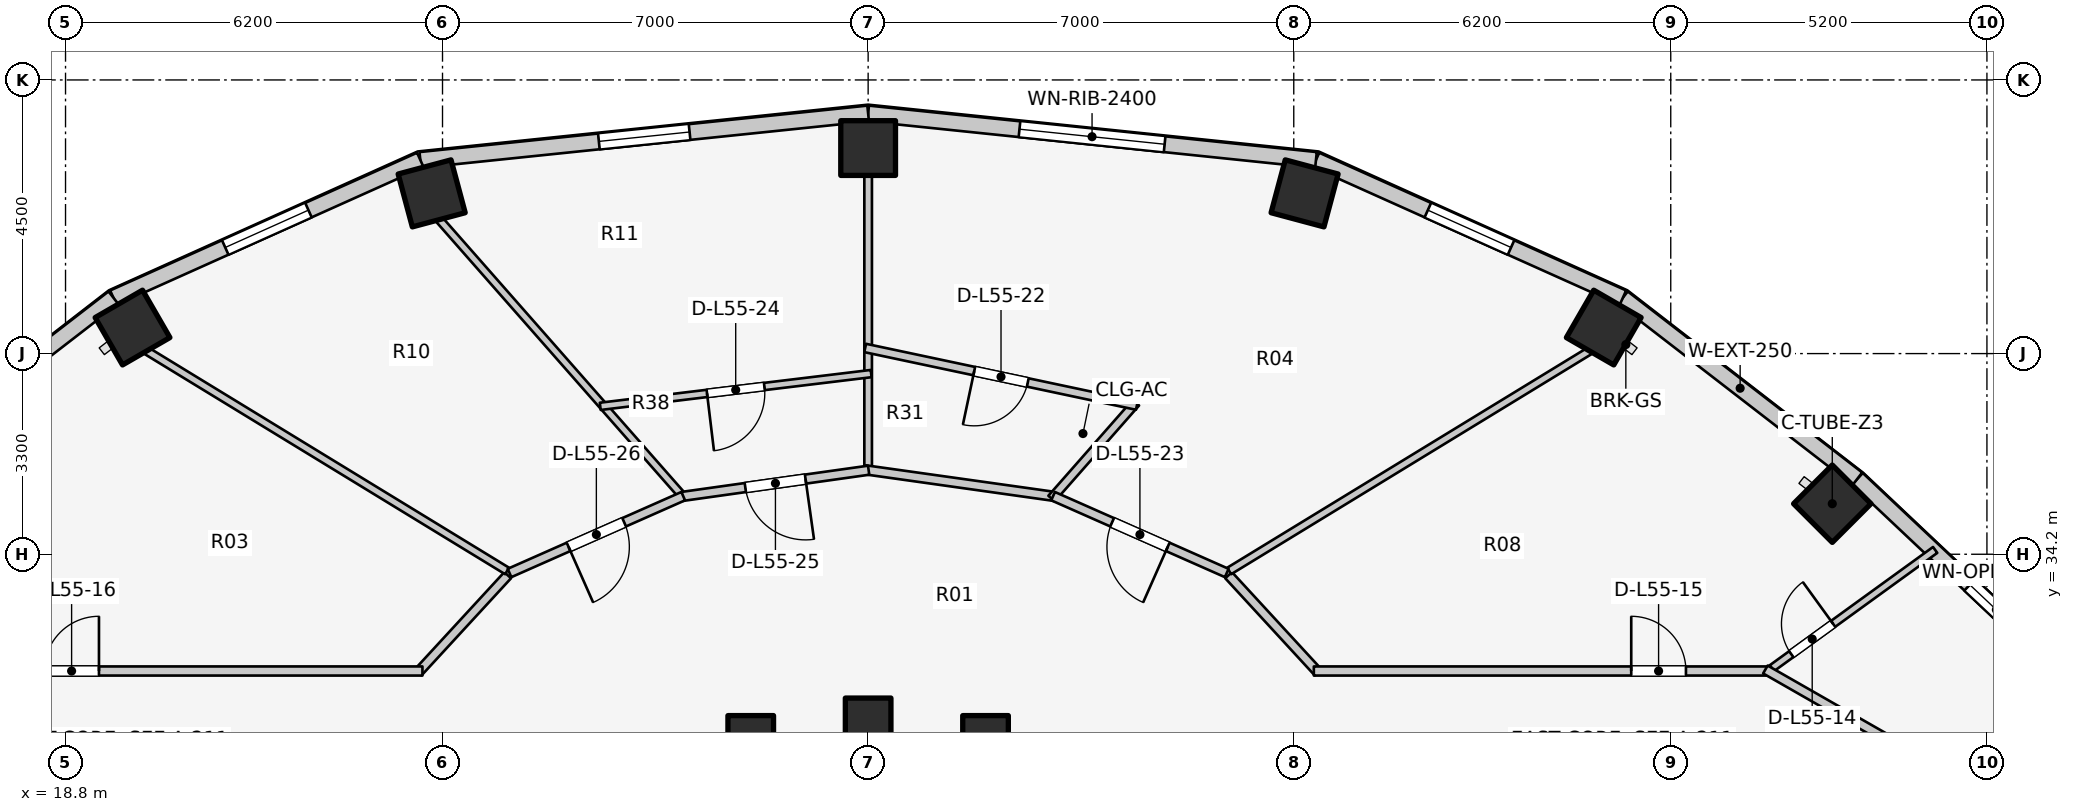
"""IFC4 building model, lengths in metres.
Left out: names, types, materials, properties, quantities, classifications, styles, units other than length and angle.
Written with IfcOpenShell. Run it as: python <this file> out.ifc"""

import sys

from ifc_helpers import new_model, si_unit, direction, frame, frame_2d, origin, origin_2d, place, context, subcontext, project, spatial, rectangle, extrude, element, fill, save


model = new_model("IFC4")
c1 = context("Model", 3, precision=1e-05, world=origin(), true_north=direction((0.0, 1.0)))
c2 = subcontext(c1, "Body", "Model", "MODEL_VIEW")
j1 = project(units=[si_unit("LENGTHUNIT", "METRE"), si_unit("PLANEANGLEUNIT", "RADIAN")], contexts=[c1])
p1 = place(None, origin())
s1 = spatial("IfcSite", under=j1, at=p1, CompositionType="ELEMENT")
p2 = place(p1, origin())
s2 = spatial("IfcBuilding", under=s1, at=p2, CompositionType="ELEMENT")
p3 = place(p2, frame((0.0, 0.0, 180.8)))
s3 = spatial("IfcBuildingStorey", under=s2, at=p3, CompositionType="ELEMENT", Elevation=180.8)
for number, where, z_axis, x_axis in (
    (1, (47.857, 35.031, 0.0), (0.0, 0.0, 1.0), (0.707, 0.707, 0.0)),
    (2, (44.098, 37.928, 0.0), (0.0, 0.0, 1.0), (0.5, 0.866, 0.0)),
):
    element("IfcColumn", number, at=place(p3, frame(where, z_axis=z_axis, x_axis=x_axis)), inside=s3, PredefinedType="COLUMN", context=c2, shape_type="SweptSolid", body=[
        extrude(rectangle(XDim=0.9, YDim=0.9, at=origin_2d()), origin(), (0.0, 0.0, 1.0), 3.1),
    ])
p4 = place(p3, frame((33.931, 31.172, 0.0), z_axis=(0.0, 0.0, 1.0), x_axis=(1.0, 0.0, 0.0)))
e3 = element("IfcColumn", 3, at=p4, inside=s3, PredefinedType="COLUMN", context=c2, shape_type="SweptSolid", body=[
    extrude(rectangle(XDim=0.75, YDim=0.75, at=origin_2d()), origin(), (0.0, 0.0, 1.0), 3.1),
])
p5 = place(p3, frame((39.178, 40.135, 0.0), z_axis=(0.0, 0.0, 1.0), x_axis=(0.258819045103, 0.965925826289, 0.0)))
e4 = element("IfcColumn", 4, at=p5, inside=s3, PredefinedType="COLUMN", context=c2, shape_type="SweptSolid", body=[
    extrude(rectangle(XDim=0.9, YDim=0.9, at=origin_2d()), origin(), (0.0, 0.0, 1.0), 3.1),
])
p6 = place(p3, frame((32.0, 31.46, 0.0), z_axis=(0.0, 0.0, 1.0), x_axis=(1.0, 0.0, 0.0)))
e5 = element("IfcColumn", 5, at=p6, inside=s3, PredefinedType="COLUMN", context=c2, shape_type="SweptSolid", body=[
    extrude(rectangle(XDim=0.75, YDim=0.75, at=origin_2d()), origin(), (0.0, 0.0, 1.0), 3.1),
])
p7 = place(p3, frame((32.0, 40.88, 0.0), z_axis=(0.0, 0.0, 1.0), x_axis=(0.0, 1.0, 0.0)))
e6 = element("IfcColumn", 6, at=p7, inside=s3, PredefinedType="COLUMN", context=c2, shape_type="SweptSolid", body=[
    extrude(rectangle(XDim=0.9, YDim=0.9, at=origin_2d()), origin(), (0.0, 0.0, 1.0), 3.1),
])
p8 = place(p3, frame((30.069, 31.172, 0.0), z_axis=(0.0, 0.0, 1.0), x_axis=(1.0, 0.0, 0.0)))
e7 = element("IfcColumn", 7, at=p8, inside=s3, PredefinedType="COLUMN", context=c2, shape_type="SweptSolid", body=[
    extrude(rectangle(XDim=0.75, YDim=0.75, at=origin_2d()), origin(), (0.0, 0.0, 1.0), 3.1),
])
for number, where, z_axis, x_axis in (
    (8, (24.822, 40.135, 0.0), (0.0, 0.0, 1.0), (-0.259, 0.966, 0.0)),
    (9, (19.902, 37.928, 0.0), (0.0, 0.0, 1.0), (-0.5, 0.866, 0.0)),
):
    element("IfcColumn", number, at=place(p3, frame(where, z_axis=z_axis, x_axis=x_axis)), inside=s3, PredefinedType="COLUMN", context=c2, shape_type="SweptSolid", body=[
        extrude(rectangle(XDim=0.9, YDim=0.9, at=origin_2d()), origin(), (0.0, 0.0, 1.0), 3.1),
    ])
p9 = place(p3, frame((51.619, 32.284, 0.0), z_axis=(0.0, 0.0, 1.0), x_axis=(-0.727667301037, 0.68593024354, 0.0)))
e10 = element("IfcWall", 10, at=p9, inside=s3, PredefinedType="STANDARD", context=c2, shape_type="SweptSolid", body=[
    extrude(rectangle(XDim=4.604, YDim=0.26, at=frame_2d((2.302, 0.0))), origin(), (0.0, 0.0, 1.0), 2.85),
])
p10 = place(p9, frame((0.862, 0.0, 0.75)))
e11 = element("IfcOpeningElement", 11, at=p10, cuts=e10, PredefinedType="OPENING", context=c2, shape_type="SweptSolid", body=[
    extrude(rectangle(XDim=1.2, YDim=1.5, at=frame_2d((0.6, 0.75))), frame((0.0, 0.14, 0.0), z_axis=(0.0, -1.0, 0.0), x_axis=(1.0, 0.0, 0.0)), (0.0, 0.0, 1.0), 0.28),
])
p11 = place(p3, frame((48.269, 35.441, 0.0), z_axis=(0.0, 0.0, 1.0), x_axis=(-0.791460185804, 0.611220724687, 0.0)))
e12 = element("IfcWall", 12, at=p11, inside=s3, PredefinedType="STANDARD", context=c2, shape_type="SweptSolid", body=[
    extrude(rectangle(XDim=4.872, YDim=0.26, at=frame_2d((2.436, 0.0))), origin(), (0.0, 0.0, 1.0), 2.85),
])
p12 = place(p3, frame((44.413, 38.419, 0.0), z_axis=(0.0, 0.0, 1.0), x_axis=(-0.912353637112, 0.409403029847, 0.0)))
e13 = element("IfcWall", 13, at=p12, inside=s3, PredefinedType="STANDARD", context=c2, shape_type="SweptSolid", body=[
    extrude(rectangle(XDim=5.533, YDim=0.26, at=frame_2d((2.766, 0.0))), origin(), (0.0, 0.0, 1.0), 2.85),
])
p13 = place(p12, frame((2.016, 0.0, 0.75)))
e14 = element("IfcOpeningElement", 14, at=p13, cuts=e13, PredefinedType="OPENING", context=c2, shape_type="SweptSolid", body=[
    extrude(rectangle(XDim=1.5, YDim=1.6, at=frame_2d((0.75, 0.8))), frame((0.0, 0.14, 0.0), z_axis=(0.0, -1.0, 0.0), x_axis=(1.0, 0.0, 0.0)), (0.0, 0.0, 1.0), 0.28),
])
p14 = place(p3, frame((39.365, 40.685, 0.0), z_axis=(0.0, 0.0, 1.0), x_axis=(-0.994664178965, 0.10316574569, 0.0)))
e15 = element("IfcWall", 15, at=p14, inside=s3, PredefinedType="STANDARD", context=c2, shape_type="SweptSolid", body=[
    extrude(rectangle(XDim=7.405, YDim=0.26, at=frame_2d((3.702, 0.0))), origin(), (0.0, 0.0, 1.0), 2.85),
])
p15 = place(p14, frame((2.502, 0.0, 0.75)))
e16 = element("IfcOpeningElement", 16, at=p15, cuts=e15, PredefinedType="OPENING", context=c2, shape_type="SweptSolid", body=[
    extrude(rectangle(XDim=2.4, YDim=1.7, at=frame_2d((1.2, 0.85))), frame((0.0, 0.14, 0.0), z_axis=(0.0, -1.0, 0.0), x_axis=(1.0, 0.0, 0.0)), (0.0, 0.0, 1.0), 0.28),
])
p16 = place(p3, frame((32.0, 41.448, 0.0), z_axis=(0.0, 0.0, 1.0), x_axis=(-0.994664178965, -0.10316574569, 0.0)))
e17 = element("IfcWall", 17, at=p16, inside=s3, PredefinedType="STANDARD", context=c2, shape_type="SweptSolid", body=[
    extrude(rectangle(XDim=7.405, YDim=0.26, at=frame_2d((3.702, 0.0))), origin(), (0.0, 0.0, 1.0), 2.85),
])
p17 = place(p16, frame((2.952, 0.0, 0.75)))
e18 = element("IfcOpeningElement", 18, at=p17, cuts=e17, PredefinedType="OPENING", context=c2, shape_type="SweptSolid", body=[
    extrude(rectangle(XDim=1.5, YDim=1.6, at=frame_2d((0.75, 0.8))), frame((0.0, 0.14, 0.0), z_axis=(0.0, -1.0, 0.0), x_axis=(1.0, 0.0, 0.0)), (0.0, 0.0, 1.0), 0.28),
])
p18 = place(p3, frame((24.635, 40.685, 0.0), z_axis=(0.0, 0.0, 1.0), x_axis=(-0.912353637112, -0.409403029847, 0.0)))
e19 = element("IfcWall", 19, at=p18, inside=s3, PredefinedType="STANDARD", context=c2, shape_type="SweptSolid", body=[
    extrude(rectangle(XDim=5.533, YDim=0.26, at=frame_2d((2.766, 0.0))), origin(), (0.0, 0.0, 1.0), 2.85),
])
p19 = place(p18, frame((2.016, 0.0, 0.75)))
e20 = element("IfcOpeningElement", 20, at=p19, cuts=e19, PredefinedType="OPENING", context=c2, shape_type="SweptSolid", body=[
    extrude(rectangle(XDim=1.5, YDim=1.6, at=frame_2d((0.75, 0.8))), frame((0.0, 0.14, 0.0), z_axis=(0.0, -1.0, 0.0), x_axis=(1.0, 0.0, 0.0)), (0.0, 0.0, 1.0), 0.28),
])
p20 = place(p3, frame((19.587, 38.419, 0.0), z_axis=(0.0, 0.0, 1.0), x_axis=(-0.791460185804, -0.611220724687, 0.0)))
e21 = element("IfcWall", 21, at=p20, inside=s3, PredefinedType="STANDARD", context=c2, shape_type="SweptSolid", body=[
    extrude(rectangle(XDim=4.872, YDim=0.26, at=frame_2d((2.436, 0.0))), origin(), (0.0, 0.0, 1.0), 2.85),
])
p21 = place(p3, frame((46.76, 32.251, 0.0), z_axis=(0.0, 0.0, 1.0), x_axis=(0.80983526768, 0.58665734396, 0.0)))
e22 = element("IfcWall", 22, at=p21, inside=s3, PredefinedType="MOVABLE", context=c2, shape_type="SweptSolid", body=[
    extrude(rectangle(XDim=3.444, YDim=0.12, at=frame_2d((1.722, 0.0))), origin(), (0.0, 0.0, 1.0), 2.22),
])
p22 = place(p21, frame((0.522, 0.0, 0.0)))
e23 = element("IfcOpeningElement", 23, at=p22, cuts=e22, PredefinedType="OPENING", context=c2, shape_type="SweptSolid", body=[
    extrude(rectangle(XDim=0.85, YDim=2.05, at=frame_2d((0.425, 1.025))), frame((0.0, 0.07, 0.0), z_axis=(0.0, -1.0, 0.0), x_axis=(1.0, 0.0, 0.0)), (0.0, 0.0, 1.0), 0.14),
])
p23 = place(p3, frame((37.928, 33.856, 0.0), z_axis=(0.0, 0.0, 1.0), x_axis=(0.677579737957, -0.735449317567, 0.0)))
e24 = element("IfcWall", 24, at=p23, inside=s3, PredefinedType="PARTITIONING", context=c2, shape_type="SweptSolid", body=[
    extrude(rectangle(XDim=2.173, YDim=0.15, at=frame_2d((1.086, 0.0))), origin(), (0.0, 0.0, 1.0), 2.299),
])
p24 = place(p3, frame((39.33, 32.28, 0.0), z_axis=(0.0, 0.0, 1.0), x_axis=(1.0, 0.0, 0.0)))
e25 = element("IfcWall", 25, at=p24, inside=s3, PredefinedType="PARTITIONING", context=c2, shape_type="SweptSolid", body=[
    extrude(rectangle(XDim=7.52, YDim=0.15, at=frame_2d((3.76, 0.0))), origin(), (0.0, 0.0, 1.0), 2.299),
])
p25 = place(p24, frame((5.22, 0.0, 0.0)))
e26 = element("IfcOpeningElement", 26, at=p25, cuts=e25, PredefinedType="OPENING", context=c2, shape_type="SweptSolid", body=[
    extrude(rectangle(XDim=0.9, YDim=2.1, at=frame_2d((0.45, 1.05))), frame((0.0, 0.085, 0.0), z_axis=(0.0, -1.0, 0.0), x_axis=(1.0, 0.0, 0.0)), (0.0, 0.0, 1.0), 0.17),
])
p26 = place(p3, frame((46.757, 32.305, 0.0), z_axis=(0.0, 0.0, 1.0), x_axis=(0.867991349648, -0.496579315857, 0.0)))
e27 = element("IfcWall", 27, at=p26, inside=s3, PredefinedType="PARTITIONING", context=c2, shape_type="SweptSolid", body=[
    extrude(rectangle(XDim=2.567, YDim=0.15, at=frame_2d((1.283, 0.0))), origin(), (0.0, 0.0, 1.0), 2.22),
])
p27 = place(p3, frame((26.072, 33.856, 0.0), z_axis=(0.0, 0.0, 1.0), x_axis=(-0.677579737957, -0.735449317567, 0.0)))
e28 = element("IfcWall", 28, at=p27, inside=s3, PredefinedType="PARTITIONING", context=c2, shape_type="SweptSolid", body=[
    extrude(rectangle(XDim=2.173, YDim=0.15, at=frame_2d((1.086, 0.0))), origin(), (0.0, 0.0, 1.0), 2.299),
])
p28 = place(p3, frame((17.15, 32.28, 0.0), z_axis=(0.0, 0.0, 1.0), x_axis=(1.0, 0.0, 0.0)))
e29 = element("IfcWall", 29, at=p28, inside=s3, PredefinedType="PARTITIONING", context=c2, shape_type="SweptSolid", body=[
    extrude(rectangle(XDim=7.52, YDim=0.15, at=frame_2d((3.76, 0.0))), origin(), (0.0, 0.0, 1.0), 2.299),
])
p29 = place(p28, frame((1.3, 0.0, 0.0)))
e30 = element("IfcOpeningElement", 30, at=p29, cuts=e29, PredefinedType="OPENING", context=c2, shape_type="SweptSolid", body=[
    extrude(rectangle(XDim=0.9, YDim=2.1, at=frame_2d((0.45, 1.05))), frame((0.0, 0.085, 0.0), z_axis=(0.0, -1.0, 0.0), x_axis=(1.0, 0.0, 0.0)), (0.0, 0.0, 1.0), 0.17),
])
p30 = place(p3, frame((37.938, 33.925, 0.0), z_axis=(0.0, 0.0, 1.0), x_axis=(0.853440334679, 0.521190555501, 0.0)))
e31 = element("IfcWall", 31, at=p30, inside=s3, PredefinedType="PARTITIONING", context=c2, shape_type="SweptSolid", body=[
    extrude(rectangle(XDim=6.966, YDim=0.125, at=frame_2d((3.483, 0.0))), origin(), (0.0, 0.0, 1.0), 2.299),
])
p31 = place(p3, frame((32.0, 35.637, 0.0), z_axis=(0.0, 0.0, 1.0), x_axis=(0.0, 1.0, 0.0)))
e32 = element("IfcWall", 32, at=p31, inside=s3, PredefinedType="PARTITIONING", context=c2, shape_type="SweptSolid", body=[
    extrude(rectangle(XDim=4.813, YDim=0.125, at=frame_2d((2.406, 0.0))), origin(), (0.0, 0.0, 1.0), 2.299),
])
p32 = place(p3, frame((28.914, 35.195, 0.0), z_axis=(0.0, 0.0, 1.0), x_axis=(-0.660581320981, 0.750754499401, 0.0)))
e33 = element("IfcWall", 33, at=p32, inside=s3, PredefinedType="PARTITIONING", context=c2, shape_type="SweptSolid", body=[
    extrude(rectangle(XDim=6.027, YDim=0.125, at=frame_2d((3.013, 0.0))), origin(), (0.0, 0.0, 1.0), 2.299),
])
p33 = place(p3, frame((26.062, 33.925, 0.0), z_axis=(0.0, 0.0, 1.0), x_axis=(-0.853440334679, 0.521190555501, 0.0)))
e34 = element("IfcWall", 34, at=p33, inside=s3, PredefinedType="PARTITIONING", context=c2, shape_type="SweptSolid", body=[
    extrude(rectangle(XDim=6.966, YDim=0.125, at=frame_2d((3.483, 0.0))), origin(), (0.0, 0.0, 1.0), 2.299),
])
p34 = place(p3, frame((35.099, 35.146, 0.0), z_axis=(0.0, 0.0, 1.0), x_axis=(-0.990251283702, 0.139292480508, 0.0)))
e35 = element("IfcWall", 35, at=p34, inside=s3, PredefinedType="PARTITIONING", context=c2, shape_type="SweptSolid", body=[
    extrude(rectangle(XDim=3.179, YDim=0.15, at=frame_2d((1.59, 0.0))), origin(), (0.0, 0.0, 1.0), 2.299),
])
p35 = place(p3, frame((35.016, 35.116, 0.0), z_axis=(0.0, 0.0, 1.0), x_axis=(0.660559753652, 0.750773475727, 0.0)))
e36 = element("IfcWall", 36, at=p35, inside=s3, PredefinedType="PLUMBINGWALL", context=c2, shape_type="SweptSolid", body=[
    extrude(rectangle(XDim=2.1, YDim=0.14, at=frame_2d((1.05, 0.0))), origin(), (0.0, 0.0, 1.0), 2.385),
])
p36 = place(p3, frame((36.419, 36.644, 0.0), z_axis=(0.0, 0.0, 1.0), x_axis=(-0.978225905005, 0.20754295646, 0.0)))
e37 = element("IfcWall", 37, at=p36, inside=s3, PredefinedType="PLUMBINGWALL", context=c2, shape_type="SweptSolid", body=[
    extrude(rectangle(XDim=4.568, YDim=0.14, at=frame_2d((2.284, 0.0))), origin(), (0.0, 0.0, 1.0), 2.299),
])
p37 = place(p36, frame((1.834, 0.0, 0.0)))
e38 = element("IfcOpeningElement", 38, at=p37, cuts=e37, PredefinedType="OPENING", context=c2, shape_type="SweptSolid", body=[
    extrude(rectangle(XDim=0.9, YDim=2.1, at=frame_2d((0.45, 1.05))), frame((0.0, 0.08, 0.0), z_axis=(0.0, -1.0, 0.0), x_axis=(1.0, 0.0, 0.0)), (0.0, 0.0, 1.0), 0.16),
])
p38 = place(p3, frame((37.898, 33.892, 0.0), z_axis=(0.0, 0.0, 1.0), x_axis=(-0.914519212393, 0.40454247016, 0.0)))
e39 = element("IfcWall", 39, at=p38, inside=s3, PredefinedType="PARTITIONING", context=c2, shape_type="SweptSolid", body=[
    extrude(rectangle(XDim=3.124, YDim=0.15, at=frame_2d((1.562, 0.0))), origin(), (0.0, 0.0, 1.0), 2.299),
])
p39 = place(p38, frame((1.062, 0.0, 0.0)))
e40 = element("IfcOpeningElement", 40, at=p39, cuts=e39, PredefinedType="OPENING", context=c2, shape_type="SweptSolid", body=[
    extrude(rectangle(XDim=1.0, YDim=2.1, at=frame_2d((0.5, 1.05))), frame((0.0, 0.085, 0.0), z_axis=(0.0, -1.0, 0.0), x_axis=(1.0, 0.0, 0.0)), (0.0, 0.0, 1.0), 0.17),
])
p40 = place(p3, frame((32.05, 37.171, 0.0), z_axis=(0.0, 0.0, 1.0), x_axis=(-0.992759753087, -0.120116912424, 0.0)))
e41 = element("IfcWall", 41, at=p40, inside=s3, PredefinedType="MOVABLE", context=c2, shape_type="SweptSolid", body=[
    extrude(rectangle(XDim=4.488, YDim=0.12, at=frame_2d((2.244, 0.0))), origin(), (0.0, 0.0, 1.0), 2.299),
])
p41 = place(p40, frame((1.769, 0.0, 0.0)))
e42 = element("IfcOpeningElement", 42, at=p41, cuts=e41, PredefinedType="OPENING", context=c2, shape_type="SweptSolid", body=[
    extrude(rectangle(XDim=0.95, YDim=2.1, at=frame_2d((0.475, 1.05))), frame((0.0, 0.07, 0.0), z_axis=(0.0, -1.0, 0.0), x_axis=(1.0, 0.0, 0.0)), (0.0, 0.0, 1.0), 0.14),
])
p42 = place(p3, frame((32.008, 35.582, 0.0), z_axis=(0.0, 0.0, 1.0), x_axis=(-0.990254709652, -0.13926812274, 0.0)))
e43 = element("IfcWall", 43, at=p42, inside=s3, PredefinedType="PARTITIONING", context=c2, shape_type="SweptSolid", body=[
    extrude(rectangle(XDim=3.096, YDim=0.15, at=frame_2d((1.548, 0.0))), origin(), (0.0, 0.0, 1.0), 2.299),
])
p43 = place(p42, frame((1.048, 0.0, 0.0)))
e44 = element("IfcOpeningElement", 44, at=p43, cuts=e43, PredefinedType="OPENING", context=c2, shape_type="SweptSolid", body=[
    extrude(rectangle(XDim=1.0, YDim=2.1, at=frame_2d((0.5, 1.05))), frame((0.0, 0.085, 0.0), z_axis=(0.0, -1.0, 0.0), x_axis=(1.0, 0.0, 0.0)), (0.0, 0.0, 1.0), 0.17),
])
p44 = place(p3, frame((28.958, 35.156, 0.0), z_axis=(0.0, 0.0, 1.0), x_axis=(-0.914519212393, -0.40454247016, 0.0)))
e45 = element("IfcWall", 45, at=p44, inside=s3, PredefinedType="PARTITIONING", context=c2, shape_type="SweptSolid", body=[
    extrude(rectangle(XDim=3.124, YDim=0.15, at=frame_2d((1.562, 0.0))), origin(), (0.0, 0.0, 1.0), 2.299),
])
p45 = place(p44, frame((1.062, 0.0, 0.0)))
e46 = element("IfcOpeningElement", 46, at=p45, cuts=e45, PredefinedType="OPENING", context=c2, shape_type="SweptSolid", body=[
    extrude(rectangle(XDim=1.0, YDim=2.1, at=frame_2d((0.5, 1.05))), frame((0.0, 0.085, 0.0), z_axis=(0.0, -1.0, 0.0), x_axis=(1.0, 0.0, 0.0)), (0.0, 0.0, 1.0), 0.17),
])
p46 = place(p10, origin())
e47 = element("IfcWindow", 47, at=p46, inside=s3, PartitioningType="SINGLE_PANEL", PredefinedType="WINDOW", context=c2, shape_type="SweptSolid", body=[
    extrude(rectangle(XDim=1.2, YDim=1.5, at=frame_2d((0.6, 0.75))), frame((0.0, 0.03, 0.0), z_axis=(0.0, -1.0, 0.0), x_axis=(1.0, 0.0, 0.0)), (0.0, 0.0, 1.0), 0.06),
])
fill(e11, e47)
p47 = place(p13, origin())
e48 = element("IfcWindow", 48, at=p47, inside=s3, PartitioningType="SINGLE_PANEL", PredefinedType="WINDOW", context=c2, shape_type="SweptSolid", body=[
    extrude(rectangle(XDim=1.5, YDim=1.6, at=frame_2d((0.75, 0.8))), frame((0.0, 0.03, 0.0), z_axis=(0.0, -1.0, 0.0), x_axis=(1.0, 0.0, 0.0)), (0.0, 0.0, 1.0), 0.06),
])
fill(e14, e48)
p48 = place(p15, origin())
e49 = element("IfcWindow", 49, at=p48, inside=s3, PartitioningType="SINGLE_PANEL", PredefinedType="WINDOW", context=c2, shape_type="SweptSolid", body=[
    extrude(rectangle(XDim=2.4, YDim=1.7, at=frame_2d((1.2, 0.85))), frame((0.0, 0.03, 0.0), z_axis=(0.0, -1.0, 0.0), x_axis=(1.0, 0.0, 0.0)), (0.0, 0.0, 1.0), 0.06),
])
fill(e16, e49)
p49 = place(p17, origin())
e50 = element("IfcWindow", 50, at=p49, inside=s3, PartitioningType="SINGLE_PANEL", PredefinedType="WINDOW", context=c2, shape_type="SweptSolid", body=[
    extrude(rectangle(XDim=1.5, YDim=1.6, at=frame_2d((0.75, 0.8))), frame((0.0, 0.03, 0.0), z_axis=(0.0, -1.0, 0.0), x_axis=(1.0, 0.0, 0.0)), (0.0, 0.0, 1.0), 0.06),
])
fill(e18, e50)
p50 = place(p19, origin())
e51 = element("IfcWindow", 51, at=p50, inside=s3, PartitioningType="SINGLE_PANEL", PredefinedType="WINDOW", context=c2, shape_type="SweptSolid", body=[
    extrude(rectangle(XDim=1.5, YDim=1.6, at=frame_2d((0.75, 0.8))), frame((0.0, 0.03, 0.0), z_axis=(0.0, -1.0, 0.0), x_axis=(1.0, 0.0, 0.0)), (0.0, 0.0, 1.0), 0.06),
])
fill(e20, e51)
p51 = place(p22, origin())
e52 = element("IfcDoor", 52, at=p51, inside=s3, OperationType="SINGLE_SWING_RIGHT", PredefinedType="DOOR", context=c2, shape_type="SweptSolid", body=[
    extrude(rectangle(XDim=0.85, YDim=2.05, at=frame_2d((0.425, 1.025))), frame((0.0, 0.025, 0.0), z_axis=(0.0, -1.0, 0.0), x_axis=(1.0, 0.0, 0.0)), (0.0, 0.0, 1.0), 0.05),
])
fill(e23, e52)
p52 = place(p25, origin())
e53 = element("IfcDoor", 53, at=p52, inside=s3, OperationType="SINGLE_SWING_LEFT", PredefinedType="DOOR", context=c2, shape_type="SweptSolid", body=[
    extrude(rectangle(XDim=0.9, YDim=2.1, at=frame_2d((0.45, 1.05))), frame((0.0, 0.025, 0.0), z_axis=(0.0, -1.0, 0.0), x_axis=(1.0, 0.0, 0.0)), (0.0, 0.0, 1.0), 0.05),
])
fill(e26, e53)
p53 = place(p29, origin())
e54 = element("IfcDoor", 54, at=p53, inside=s3, OperationType="SINGLE_SWING_RIGHT", PredefinedType="DOOR", context=c2, shape_type="SweptSolid", body=[
    extrude(rectangle(XDim=0.9, YDim=2.1, at=frame_2d((0.45, 1.05))), frame((0.0, 0.025, 0.0), z_axis=(0.0, -1.0, 0.0), x_axis=(1.0, 0.0, 0.0)), (0.0, 0.0, 1.0), 0.05),
])
fill(e30, e54)
p54 = place(p37, origin())
e55 = element("IfcDoor", 55, at=p54, inside=s3, OperationType="SINGLE_SWING_RIGHT", PredefinedType="DOOR", context=c2, shape_type="SweptSolid", body=[
    extrude(rectangle(XDim=0.9, YDim=2.1, at=frame_2d((0.45, 1.05))), frame((0.0, 0.025, 0.0), z_axis=(0.0, -1.0, 0.0), x_axis=(1.0, 0.0, 0.0)), (0.0, 0.0, 1.0), 0.05),
])
fill(e38, e55)
p55 = place(p39, origin())
e56 = element("IfcDoor", 56, at=p55, inside=s3, OperationType="SINGLE_SWING_LEFT", PredefinedType="DOOR", context=c2, shape_type="SweptSolid", body=[
    extrude(rectangle(XDim=1.0, YDim=2.1, at=frame_2d((0.5, 1.05))), frame((0.0, 0.025, 0.0), z_axis=(0.0, -1.0, 0.0), x_axis=(1.0, 0.0, 0.0)), (0.0, 0.0, 1.0), 0.05),
])
fill(e40, e56)
p56 = place(p41, origin())
e57 = element("IfcDoor", 57, at=p56, inside=s3, OperationType="SINGLE_SWING_RIGHT", PredefinedType="DOOR", context=c2, shape_type="SweptSolid", body=[
    extrude(rectangle(XDim=0.95, YDim=2.1, at=frame_2d((0.475, 1.05))), frame((0.0, 0.025, 0.0), z_axis=(0.0, -1.0, 0.0), x_axis=(1.0, 0.0, 0.0)), (0.0, 0.0, 1.0), 0.05),
])
fill(e42, e57)
p57 = place(p43, origin())
e58 = element("IfcDoor", 58, at=p57, inside=s3, OperationType="SINGLE_SWING_LEFT", PredefinedType="DOOR", context=c2, shape_type="SweptSolid", body=[
    extrude(rectangle(XDim=1.0, YDim=2.1, at=frame_2d((0.5, 1.05))), frame((0.0, 0.025, 0.0), z_axis=(0.0, -1.0, 0.0), x_axis=(1.0, 0.0, 0.0)), (0.0, 0.0, 1.0), 0.05),
])
fill(e44, e58)
p58 = place(p45, origin())
e59 = element("IfcDoor", 59, at=p58, inside=s3, OperationType="SINGLE_SWING_RIGHT", PredefinedType="DOOR", context=c2, shape_type="SweptSolid", body=[
    extrude(rectangle(XDim=1.0, YDim=2.1, at=frame_2d((0.5, 1.05))), frame((0.0, 0.025, 0.0), z_axis=(0.0, -1.0, 0.0), x_axis=(1.0, 0.0, 0.0)), (0.0, 0.0, 1.0), 0.05),
])
fill(e46, e59)
save(model, sys.argv[1])
